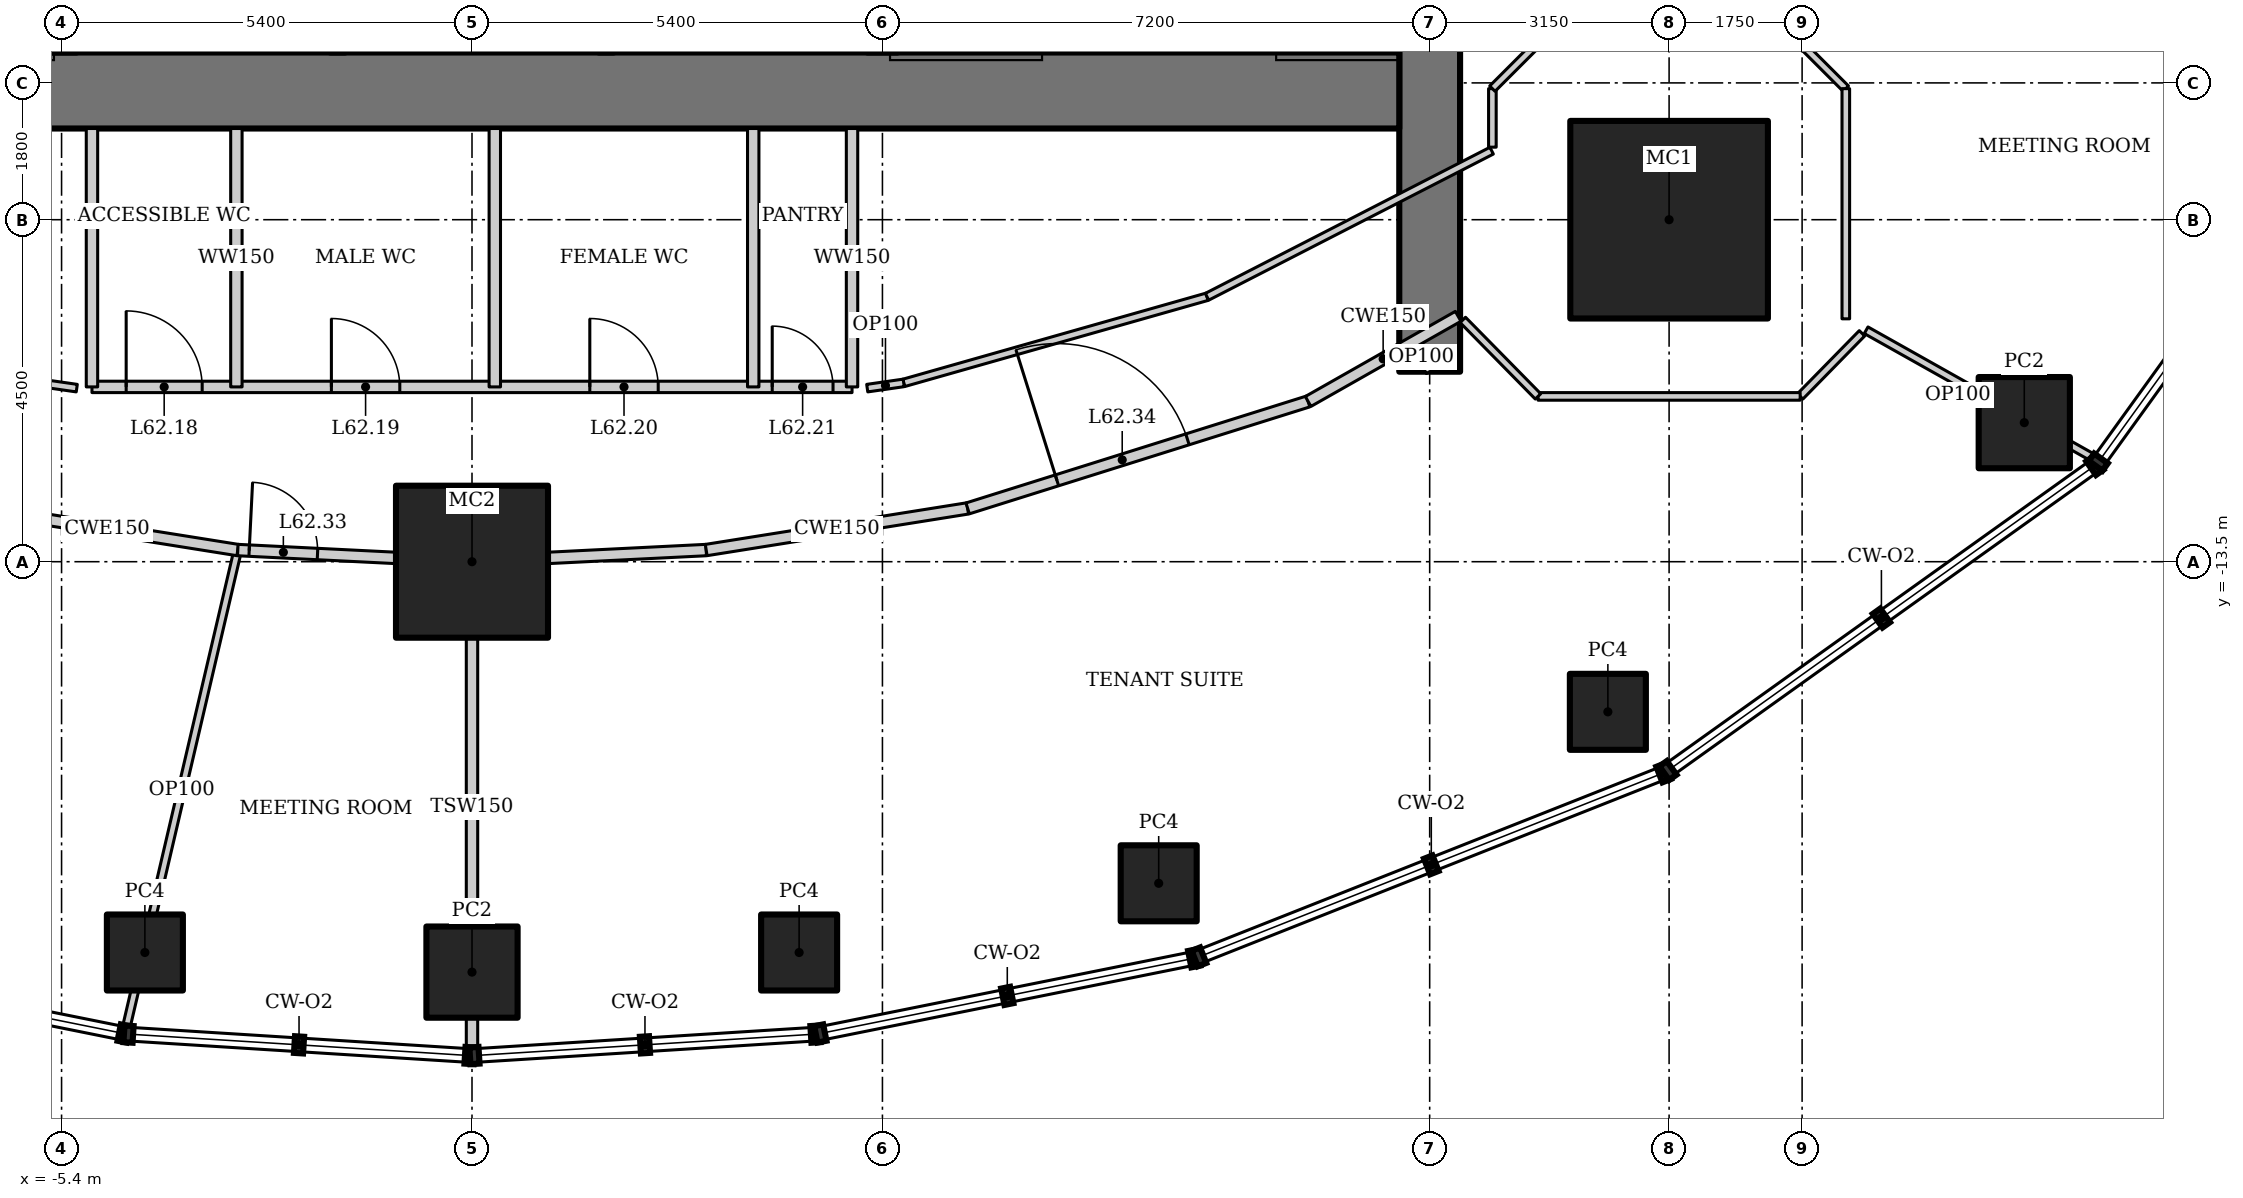
"""IFC4 building model, lengths in metres.
Left out: names, types, materials, properties, quantities, classifications, styles, units other than length and angle.
Written with IfcOpenShell. Run it as: python <this file> out.ifc"""

import sys

from ifc_helpers import new_model, si_unit, direction, frame, frame_2d, origin, origin_2d, place, context, subcontext, project, spatial, rectangle, hollow_rectangle, extrude, element, fill, save


model = new_model("IFC4")
c1 = context("Model", 3, precision=1e-05, world=origin(), true_north=direction((0.0, 1.0)))
c2 = subcontext(c1, "Body", "Model", "MODEL_VIEW")
j1 = project(units=[si_unit("LENGTHUNIT", "METRE"), si_unit("PLANEANGLEUNIT", "RADIAN")], contexts=[c1])
p1 = place(None, origin())
s1 = spatial("IfcSite", under=j1, at=p1, CompositionType="ELEMENT")
p2 = place(p1, origin())
s2 = spatial("IfcBuilding", under=s1, at=p2, CompositionType="ELEMENT")
p3 = place(p2, frame((0.0, 0.0, 266.2)))
s3 = spatial("IfcBuildingStorey", under=s2, at=p3, CompositionType="ELEMENT", Elevation=266.2)
p4 = place(p3, frame((0.0, -13.5, 0.0), z_axis=(0.0, 0.0, 1.0), x_axis=(1.0, 0.0, 0.0)))
e1 = element("IfcColumn", 1, at=p4, inside=s3, PredefinedType="COLUMN", context=c2, shape_type="SweptSolid", body=[
    extrude(hollow_rectangle(XDim=2.0, YDim=2.0, WallThickness=0.17, at=origin_2d()), origin(), (0.0, 0.0, 1.0), 4.2),
])
p5 = place(p3, frame((15.75, -9.0, 0.0), z_axis=(0.0, 0.0, 1.0), x_axis=(1.0, 0.0, 0.0)))
e2 = element("IfcColumn", 2, at=p5, inside=s3, PredefinedType="COLUMN", context=c2, shape_type="SweptSolid", body=[
    extrude(hollow_rectangle(XDim=2.6, YDim=2.6, WallThickness=0.13, at=origin_2d()), origin(), (0.0, 0.0, 1.0), 4.2),
])
p6 = place(p3, frame((-4.304, -18.642, 0.0), z_axis=(0.053383974644, 0.231214251834, 0.971437142074), x_axis=(-0.974366408229, 0.224966892041, 0.0)))
e3 = element("IfcColumn", 3, at=p6, inside=s3, PredefinedType="COLUMN", context=c2, shape_type="SweptSolid", body=[
    extrude(hollow_rectangle(XDim=1.0, YDim=1.0, WallThickness=0.08, at=origin_2d()), origin(), (0.0, 0.0, 1.0), 4.198),
])
p7 = place(p3, frame((0.0, -18.9, 0.0), z_axis=(0.0, 0.23158624064, 0.972814377539), x_axis=(-1.0, 0.0, 0.0)))
e4 = element("IfcColumn", 4, at=p7, inside=s3, PredefinedType="COLUMN", context=c2, shape_type="SweptSolid", body=[
    extrude(hollow_rectangle(XDim=1.2, YDim=1.2, WallThickness=0.1, at=origin_2d()), origin(), (0.0, 0.0, 1.0), 4.172),
])
p8 = place(p3, frame((4.304, -18.642, 0.0), z_axis=(-0.053383974644, 0.231214251834, 0.971437142074), x_axis=(-0.974366408229, -0.224966892041, 0.0)))
e5 = element("IfcColumn", 5, at=p8, inside=s3, PredefinedType="COLUMN", context=c2, shape_type="SweptSolid", body=[
    extrude(hollow_rectangle(XDim=1.0, YDim=1.0, WallThickness=0.08, at=origin_2d()), origin(), (0.0, 0.0, 1.0), 4.198),
])
p9 = place(p3, frame((9.035, -17.731, 0.0), z_axis=(-0.116507553231, 0.228665645788, 0.966508154377), x_axis=(-0.891011903247, -0.453979942588, 0.0)))
e6 = element("IfcColumn", 6, at=p9, inside=s3, PredefinedType="COLUMN", context=c2, shape_type="SweptSolid", body=[
    extrude(hollow_rectangle(XDim=1.0, YDim=1.0, WallThickness=0.08, at=origin_2d()), origin(), (0.0, 0.0, 1.0), 4.21),
])
p10 = place(p3, frame((14.944, -15.475, 0.0), z_axis=(-0.208217719647, 0.215641734527, 0.954014687285), x_axis=(-0.719381611647, -0.694615070974, 0.0)))
e7 = element("IfcColumn", 7, at=p10, inside=s3, PredefinedType="COLUMN", context=c2, shape_type="SweptSolid", body=[
    extrude(hollow_rectangle(XDim=1.0, YDim=1.0, WallThickness=0.08, at=origin_2d()), origin(), (0.0, 0.0, 1.0), 4.242),
])
p11 = place(p3, frame((20.423, -11.67, 0.0), z_axis=(-0.310472199469, 0.177420864126, 0.933878391617), x_axis=(-0.496156180016, -0.868233289521, 0.0)))
e8 = element("IfcColumn", 8, at=p11, inside=s3, PredefinedType="COLUMN", context=c2, shape_type="SweptSolid", body=[
    extrude(hollow_rectangle(XDim=1.2, YDim=1.2, WallThickness=0.1, at=origin_2d()), origin(), (0.0, 0.0, 1.0), 4.264),
])
p12 = place(p3, frame((12.6, -11.0, 0.0), z_axis=(0.0, 0.0, 1.0), x_axis=(0.0, 1.0, 0.0)))
e9 = element("IfcWall", 9, at=p12, inside=s3, PredefinedType="SHEAR", context=c2, shape_type="SweptSolid", body=[
    extrude(rectangle(XDim=22.0, YDim=0.8, at=frame_2d((11.0, 0.0))), origin(), (0.0, 0.0, 1.0), 4.2),
])
p13 = place(p12, frame((10.1, 0.0, 0.0)))
e10 = element("IfcOpeningElement", 10, at=p13, cuts=e9, PredefinedType="OPENING", context=c2, shape_type="SweptSolid", body=[
    extrude(rectangle(XDim=1.8, YDim=2.1, at=frame_2d((0.9, 1.05))), frame((0.0, 0.41, 0.0), z_axis=(0.0, -1.0, 0.0), x_axis=(1.0, 0.0, 0.0)), (0.0, 0.0, 1.0), 0.82),
])
p14 = place(p3, frame((-12.2, -7.3, 0.0), z_axis=(0.0, 0.0, 1.0), x_axis=(1.0, 0.0, 0.0)))
e11 = element("IfcWall", 11, at=p14, inside=s3, PredefinedType="SHEAR", context=c2, shape_type="SweptSolid", body=[
    extrude(rectangle(XDim=24.4, YDim=1.0, at=frame_2d((12.2, 0.0))), origin(), (0.0, 0.0, 1.0), 4.2),
])
for number, where, z_axis, x_axis in (
    (12, (-1.767, -2.6, 0.0), (0.0, 0.0, 1.0), (0.0, -1.0, 0.0)),
    (13, (1.767, -2.6, 0.0), (0.0, 0.0, 1.0), (0.0, -1.0, 0.0)),
):
    element("IfcWall", number, at=place(p3, frame(where, z_axis=z_axis, x_axis=x_axis)), inside=s3, PredefinedType="SOLIDWALL", context=c2, shape_type="SweptSolid", body=[
        extrude(rectangle(XDim=4.2, YDim=0.2, at=frame_2d((2.1, 0.0))), origin(), (0.0, 0.0, 1.0), 4.2),
    ])
p15 = place(p3, frame((-4.556, -19.657, 0.0), z_axis=(0.0, 0.0, 1.0), x_axis=(0.227524978141, 0.973772244584, 0.0)))
e14 = element("IfcWall", 14, at=p15, inside=s3, PredefinedType="PARTITIONING", context=c2, shape_type="SweptSolid", body=[
    extrude(rectangle(XDim=6.48, YDim=0.1, at=frame_2d((3.24, 0.0))), origin(), (0.0, 0.0, 1.0), 3.367),
])
p16 = place(p3, frame((0.0, -19.945, 0.0), z_axis=(0.0, 0.0, 1.0), x_axis=(0.0, 1.0, 0.0)))
e15 = element("IfcWall", 15, at=p16, inside=s3, PredefinedType="PARTITIONING", context=c2, shape_type="SweptSolid", body=[
    extrude(rectangle(XDim=6.445, YDim=0.15, at=frame_2d((3.222, 0.0))), origin(), (0.0, 0.0, 1.0), 3.646),
])
p17 = place(p3, frame((-6.521, -12.799, 0.0), z_axis=(0.0, 0.0, 1.0), x_axis=(0.987554093087, -0.157279729233, 0.0)))
e16 = element("IfcWall", 16, at=p17, inside=s3, PredefinedType="PARTITIONING", context=c2, shape_type="SweptSolid", body=[
    extrude(rectangle(XDim=3.483, YDim=0.15, at=frame_2d((1.742, 0.0))), origin(), (0.0, 0.0, 1.0), 4.05),
])
p18 = place(p3, frame((-3.081, -13.347, 0.0), z_axis=(0.0, 0.0, 1.0), x_axis=(0.99876434787, -0.049696855278, 0.0)))
e17 = element("IfcWall", 17, at=p18, inside=s3, PredefinedType="PARTITIONING", context=c2, shape_type="SweptSolid", body=[
    extrude(rectangle(XDim=3.085, YDim=0.15, at=frame_2d((1.542, 0.0))), origin(), (0.0, 0.0, 1.0), 4.05),
])
p19 = place(p18, frame((0.15, 0.0, 0.0)))
e18 = element("IfcOpeningElement", 18, at=p19, cuts=e17, PredefinedType="OPENING", context=c2, shape_type="SweptSolid", body=[
    extrude(rectangle(XDim=0.9, YDim=2.1, at=frame_2d((0.45, 1.05))), frame((0.0, 0.085, 0.0), z_axis=(0.0, -1.0, 0.0), x_axis=(1.0, 0.0, 0.0)), (0.0, 0.0, 1.0), 0.17),
])
p20 = place(p3, frame((0.0, -13.5, 0.0), z_axis=(0.0, 0.0, 1.0), x_axis=(0.99876434787, 0.049696855278, 0.0)))
e19 = element("IfcWall", 19, at=p20, inside=s3, PredefinedType="PARTITIONING", context=c2, shape_type="SweptSolid", body=[
    extrude(rectangle(XDim=3.085, YDim=0.15, at=frame_2d((1.542, 0.0))), origin(), (0.0, 0.0, 1.0), 4.05),
])
p21 = place(p3, frame((3.081, -13.347, 0.0), z_axis=(0.0, 0.0, 1.0), x_axis=(0.987554093087, 0.157279729233, 0.0)))
e20 = element("IfcWall", 20, at=p21, inside=s3, PredefinedType="PARTITIONING", context=c2, shape_type="SweptSolid", body=[
    extrude(rectangle(XDim=3.483, YDim=0.15, at=frame_2d((1.742, 0.0))), origin(), (0.0, 0.0, 1.0), 4.05),
])
p22 = place(p3, frame((6.521, -12.799, 0.0), z_axis=(0.0, 0.0, 1.0), x_axis=(0.954031103669, 0.299707612903, 0.0)))
e21 = element("IfcWall", 21, at=p22, inside=s3, PredefinedType="PARTITIONING", context=c2, shape_type="SweptSolid", body=[
    extrude(rectangle(XDim=4.695, YDim=0.15, at=frame_2d((2.348, 0.0))), origin(), (0.0, 0.0, 1.0), 4.05),
])
p23 = place(p22, frame((1.231, 0.0, 0.0)))
e22 = element("IfcOpeningElement", 22, at=p23, cuts=e21, PredefinedType="OPENING", context=c2, shape_type="SweptSolid", body=[
    extrude(rectangle(XDim=1.8, YDim=2.1, at=frame_2d((0.9, 1.05))), frame((0.0, 0.085, 0.0), z_axis=(0.0, -1.0, 0.0), x_axis=(1.0, 0.0, 0.0)), (0.0, 0.0, 1.0), 0.17),
])
p24 = place(p3, frame((-5.0, -11.2, 0.0), z_axis=(0.0, 0.0, 1.0), x_axis=(1.0, 0.0, 0.0)))
e23 = element("IfcWall", 23, at=p24, inside=s3, PredefinedType="SOLIDWALL", context=c2, shape_type="SweptSolid", body=[
    extrude(rectangle(XDim=10.0, YDim=0.15, at=frame_2d((5.0, 0.0))), origin(), (0.0, 0.0, 1.0), 4.05),
])
p25 = place(p24, frame((0.45, 0.0, 0.0)))
e24 = element("IfcOpeningElement", 24, at=p25, cuts=e23, PredefinedType="OPENING", context=c2, shape_type="SweptSolid", body=[
    extrude(rectangle(XDim=1.0, YDim=2.1, at=frame_2d((0.5, 1.05))), frame((0.0, 0.085, 0.0), z_axis=(0.0, -1.0, 0.0), x_axis=(1.0, 0.0, 0.0)), (0.0, 0.0, 1.0), 0.17),
])
p26 = place(p24, frame((3.15, 0.0, 0.0)))
e25 = element("IfcOpeningElement", 25, at=p26, cuts=e23, PredefinedType="OPENING", context=c2, shape_type="SweptSolid", body=[
    extrude(rectangle(XDim=0.9, YDim=2.1, at=frame_2d((0.45, 1.05))), frame((0.0, 0.085, 0.0), z_axis=(0.0, -1.0, 0.0), x_axis=(1.0, 0.0, 0.0)), (0.0, 0.0, 1.0), 0.17),
])
p27 = place(p24, frame((6.55, 0.0, 0.0)))
e26 = element("IfcOpeningElement", 26, at=p27, cuts=e23, PredefinedType="OPENING", context=c2, shape_type="SweptSolid", body=[
    extrude(rectangle(XDim=0.9, YDim=2.1, at=frame_2d((0.45, 1.05))), frame((0.0, 0.085, 0.0), z_axis=(0.0, -1.0, 0.0), x_axis=(1.0, 0.0, 0.0)), (0.0, 0.0, 1.0), 0.17),
])
p28 = place(p24, frame((8.95, 0.0, 0.0)))
e27 = element("IfcOpeningElement", 27, at=p28, cuts=e23, PredefinedType="OPENING", context=c2, shape_type="SweptSolid", body=[
    extrude(rectangle(XDim=0.8, YDim=2.1, at=frame_2d((0.4, 1.05))), frame((0.0, 0.085, 0.0), z_axis=(0.0, -1.0, 0.0), x_axis=(1.0, 0.0, 0.0)), (0.0, 0.0, 1.0), 0.17),
])
for number, where, z_axis, x_axis in (
    (28, (-5.0, -7.8, 0.0), (0.0, 0.0, 1.0), (0.0, -1.0, 0.0)),
    (29, (5.0, -7.8, 0.0), (0.0, 0.0, 1.0), (0.0, -1.0, 0.0)),
    (30, (-3.1, -7.8, 0.0), (0.0, 0.0, 1.0), (0.0, -1.0, 0.0)),
    (31, (0.3, -7.8, 0.0), (0.0, 0.0, 1.0), (0.0, -1.0, 0.0)),
    (32, (3.7, -7.8, 0.0), (0.0, 0.0, 1.0), (0.0, -1.0, 0.0)),
):
    element("IfcWall", number, at=place(p3, frame(where, z_axis=z_axis, x_axis=x_axis)), inside=s3, PredefinedType="SOLIDWALL", context=c2, shape_type="SweptSolid", body=[
        extrude(rectangle(XDim=3.4, YDim=0.15, at=frame_2d((1.7, 0.0))), origin(), (0.0, 0.0, 1.0), 4.05),
    ])
p29 = place(p3, frame((-5.2, -11.216, 0.0), z_axis=(0.0, 0.0, 1.0), x_axis=(-0.989797891768, 0.142478536811, 0.0)))
e33 = element("IfcWall", 33, at=p29, inside=s3, PredefinedType="PARTITIONING", context=c2, shape_type="SweptSolid", body=[
    extrude(rectangle(XDim=0.485, YDim=0.1, at=frame_2d((0.242, 0.0))), origin(), (0.0, 0.0, 1.0), 4.05),
])
p30 = place(p3, frame((9.67, -10.014, 0.0), z_axis=(0.0, 0.0, 1.0), x_axis=(-0.961973498971, -0.273142796496, 0.0)))
e34 = element("IfcWall", 34, at=p30, inside=s3, PredefinedType="PARTITIONING", context=c2, shape_type="SweptSolid", body=[
    extrude(rectangle(XDim=4.148, YDim=0.1, at=frame_2d((2.074, 0.0))), origin(), (0.0, 0.0, 1.0), 4.05),
])
p31 = place(p3, frame((5.68, -11.147, 0.0), z_axis=(0.0, 0.0, 1.0), x_axis=(-0.989797891768, -0.142478536811, 0.0)))
e35 = element("IfcWall", 35, at=p31, inside=s3, PredefinedType="PARTITIONING", context=c2, shape_type="SweptSolid", body=[
    extrude(rectangle(XDim=0.485, YDim=0.1, at=frame_2d((0.242, 0.0))), origin(), (0.0, 0.0, 1.0), 4.05),
])
p32 = place(p3, frame((12.6, -11.0, 0.0), z_axis=(0.0, 0.0, 1.0), x_axis=(-0.493794495037, 0.869578631678, 0.0)))
e36 = element("IfcWall", 36, at=p32, inside=s3, PredefinedType="PARTITIONING", context=c2, shape_type="SweptSolid", body=[
    extrude(rectangle(XDim=0.449, YDim=0.1, at=frame_2d((0.225, 0.0))), origin(), (0.0, 0.0, 1.0), 4.05),
])
p33 = place(p3, frame((21.358, -12.15, 0.0), z_axis=(0.0, 0.0, 1.0), x_axis=(-0.871730019583, 0.489986502832, 0.0)))
e37 = element("IfcWall", 37, at=p33, inside=s3, PredefinedType="PARTITIONING", context=c2, shape_type="SweptSolid", body=[
    extrude(rectangle(XDim=3.46, YDim=0.1, at=frame_2d((1.73, 0.0))), origin(), (0.0, 0.0, 1.0), 3.601),
])
p34 = place(p3, frame((11.001, -11.392, 0.0), z_axis=(0.0, 0.0, 1.0), x_axis=(0.869722107117, 0.493541747366, 0.0)))
e38 = element("IfcWall", 38, at=p34, inside=s3, PredefinedType="PARTITIONING", context=c2, shape_type="SweptSolid", body=[
    extrude(rectangle(XDim=2.27, YDim=0.15, at=frame_2d((1.135, 0.0))), origin(), (0.0, 0.0, 1.0), 4.05),
])
p35 = place(p3, frame((13.415, -8.092, 0.0), z_axis=(0.0, 0.0, 1.0), x_axis=(-0.889620520549, -0.45670048108, 0.0)))
e39 = element("IfcWall", 39, at=p35, inside=s3, PredefinedType="PARTITIONING", context=c2, shape_type="SweptSolid", body=[
    extrude(rectangle(XDim=4.209, YDim=0.1, at=frame_2d((2.104, 0.0))), origin(), (0.0, 0.0, 1.0), 4.05),
])
p36 = place(p3, frame((13.425, -8.046, 0.0), z_axis=(0.0, 0.0, 1.0), x_axis=(0.0, 1.0, 0.0)))
e40 = element("IfcWall", 40, at=p36, inside=s3, PredefinedType="PARTITIONING", context=c2, shape_type="SweptSolid", body=[
    extrude(rectangle(XDim=0.77, YDim=0.1, at=frame_2d((0.385, 0.0))), origin(), (0.0, 0.0, 1.0), 4.05),
])
p37 = place(p3, frame((13.425, -7.275, 0.0), z_axis=(0.0, 0.0, 1.0), x_axis=(0.707106781187, 0.707106781187, 0.0)))
e41 = element("IfcWall", 41, at=p37, inside=s3, PredefinedType="PARTITIONING", context=c2, shape_type="SweptSolid", body=[
    extrude(rectangle(XDim=0.849, YDim=0.1, at=frame_2d((0.425, 0.0))), origin(), (0.0, 0.0, 1.0), 4.05),
])
p38 = place(p3, frame((18.288, -10.495, 0.0), z_axis=(0.0, 0.0, 1.0), x_axis=(-0.699823580681, -0.714315725659, 0.0)))
e42 = element("IfcWall", 42, at=p38, inside=s3, PredefinedType="PARTITIONING", context=c2, shape_type="SweptSolid", body=[
    extrude(rectangle(XDim=1.162, YDim=0.1, at=frame_2d((0.581, 0.0))), origin(), (0.0, 0.0, 1.0), 4.05),
])
p39 = place(p3, frame((17.475, -11.325, 0.0), z_axis=(0.0, 0.0, 1.0), x_axis=(-1.0, 0.0, 0.0)))
e43 = element("IfcWall", 43, at=p39, inside=s3, PredefinedType="PARTITIONING", context=c2, shape_type="SweptSolid", body=[
    extrude(rectangle(XDim=3.449, YDim=0.1, at=frame_2d((1.725, 0.0))), origin(), (0.0, 0.0, 1.0), 4.05),
])
p40 = place(p3, frame((14.025, -11.325, 0.0), z_axis=(0.0, 0.0, 1.0), x_axis=(-0.701113567316, 0.713049623606, 0.0)))
e44 = element("IfcWall", 44, at=p40, inside=s3, PredefinedType="PARTITIONING", context=c2, shape_type="SweptSolid", body=[
    extrude(rectangle(XDim=1.411, YDim=0.1, at=frame_2d((0.706, 0.0))), origin(), (0.0, 0.0, 1.0), 4.05),
])
p41 = place(p3, frame((17.538, -6.738, 0.0), z_axis=(0.0, 0.0, 1.0), x_axis=(0.707106781187, -0.707106781187, 0.0)))
e45 = element("IfcWall", 45, at=p41, inside=s3, PredefinedType="PARTITIONING", context=c2, shape_type="SweptSolid", body=[
    extrude(rectangle(XDim=0.76, YDim=0.1, at=frame_2d((0.38, 0.0))), origin(), (0.0, 0.0, 1.0), 4.05),
])
p42 = place(p3, frame((18.075, -7.275, 0.0), z_axis=(0.0, 0.0, 1.0), x_axis=(0.0, -1.0, 0.0)))
e46 = element("IfcWall", 46, at=p42, inside=s3, PredefinedType="PARTITIONING", context=c2, shape_type="SweptSolid", body=[
    extrude(rectangle(XDim=3.029, YDim=0.1, at=frame_2d((1.514, 0.0))), origin(), (0.0, 0.0, 1.0), 3.522),
])
p43 = place(p25, origin())
e47 = element("IfcDoor", 47, at=p43, inside=s3, OperationType="SINGLE_SWING_LEFT", PredefinedType="DOOR", context=c2, shape_type="SweptSolid", body=[
    extrude(rectangle(XDim=1.0, YDim=2.1, at=frame_2d((0.5, 1.05))), frame((0.0, 0.025, 0.0), z_axis=(0.0, -1.0, 0.0), x_axis=(1.0, 0.0, 0.0)), (0.0, 0.0, 1.0), 0.05),
])
fill(e24, e47)
p44 = place(p26, origin())
e48 = element("IfcDoor", 48, at=p44, inside=s3, OperationType="SINGLE_SWING_LEFT", PredefinedType="DOOR", context=c2, shape_type="SweptSolid", body=[
    extrude(rectangle(XDim=0.9, YDim=2.1, at=frame_2d((0.45, 1.05))), frame((0.0, 0.025, 0.0), z_axis=(0.0, -1.0, 0.0), x_axis=(1.0, 0.0, 0.0)), (0.0, 0.0, 1.0), 0.05),
])
fill(e25, e48)
p45 = place(p27, origin())
e49 = element("IfcDoor", 49, at=p45, inside=s3, OperationType="SINGLE_SWING_LEFT", PredefinedType="DOOR", context=c2, shape_type="SweptSolid", body=[
    extrude(rectangle(XDim=0.9, YDim=2.1, at=frame_2d((0.45, 1.05))), frame((0.0, 0.025, 0.0), z_axis=(0.0, -1.0, 0.0), x_axis=(1.0, 0.0, 0.0)), (0.0, 0.0, 1.0), 0.05),
])
fill(e26, e49)
p46 = place(p28, origin())
e50 = element("IfcDoor", 50, at=p46, inside=s3, OperationType="SINGLE_SWING_LEFT", PredefinedType="DOOR", context=c2, shape_type="SweptSolid", body=[
    extrude(rectangle(XDim=0.8, YDim=2.1, at=frame_2d((0.4, 1.05))), frame((0.0, 0.025, 0.0), z_axis=(0.0, -1.0, 0.0), x_axis=(1.0, 0.0, 0.0)), (0.0, 0.0, 1.0), 0.05),
])
fill(e27, e50)
p47 = place(p19, origin())
e51 = element("IfcDoor", 51, at=p47, inside=s3, OperationType="SINGLE_SWING_LEFT", PredefinedType="DOOR", context=c2, shape_type="SweptSolid", body=[
    extrude(rectangle(XDim=0.9, YDim=2.1, at=frame_2d((0.45, 1.05))), frame((0.0, 0.025, 0.0), z_axis=(0.0, -1.0, 0.0), x_axis=(1.0, 0.0, 0.0)), (0.0, 0.0, 1.0), 0.05),
])
fill(e18, e51)
p48 = place(p23, origin())
e52 = element("IfcDoor", 52, at=p48, inside=s3, OperationType="DOUBLE_DOOR_DOUBLE_SWING", PredefinedType="DOOR", context=c2, shape_type="SweptSolid", body=[
    extrude(rectangle(XDim=1.8, YDim=2.1, at=frame_2d((0.9, 1.05))), frame((0.0, 0.025, 0.0), z_axis=(0.0, -1.0, 0.0), x_axis=(1.0, 0.0, 0.0)), (0.0, 0.0, 1.0), 0.05),
])
fill(e22, e52)
save(model, sys.argv[1])
